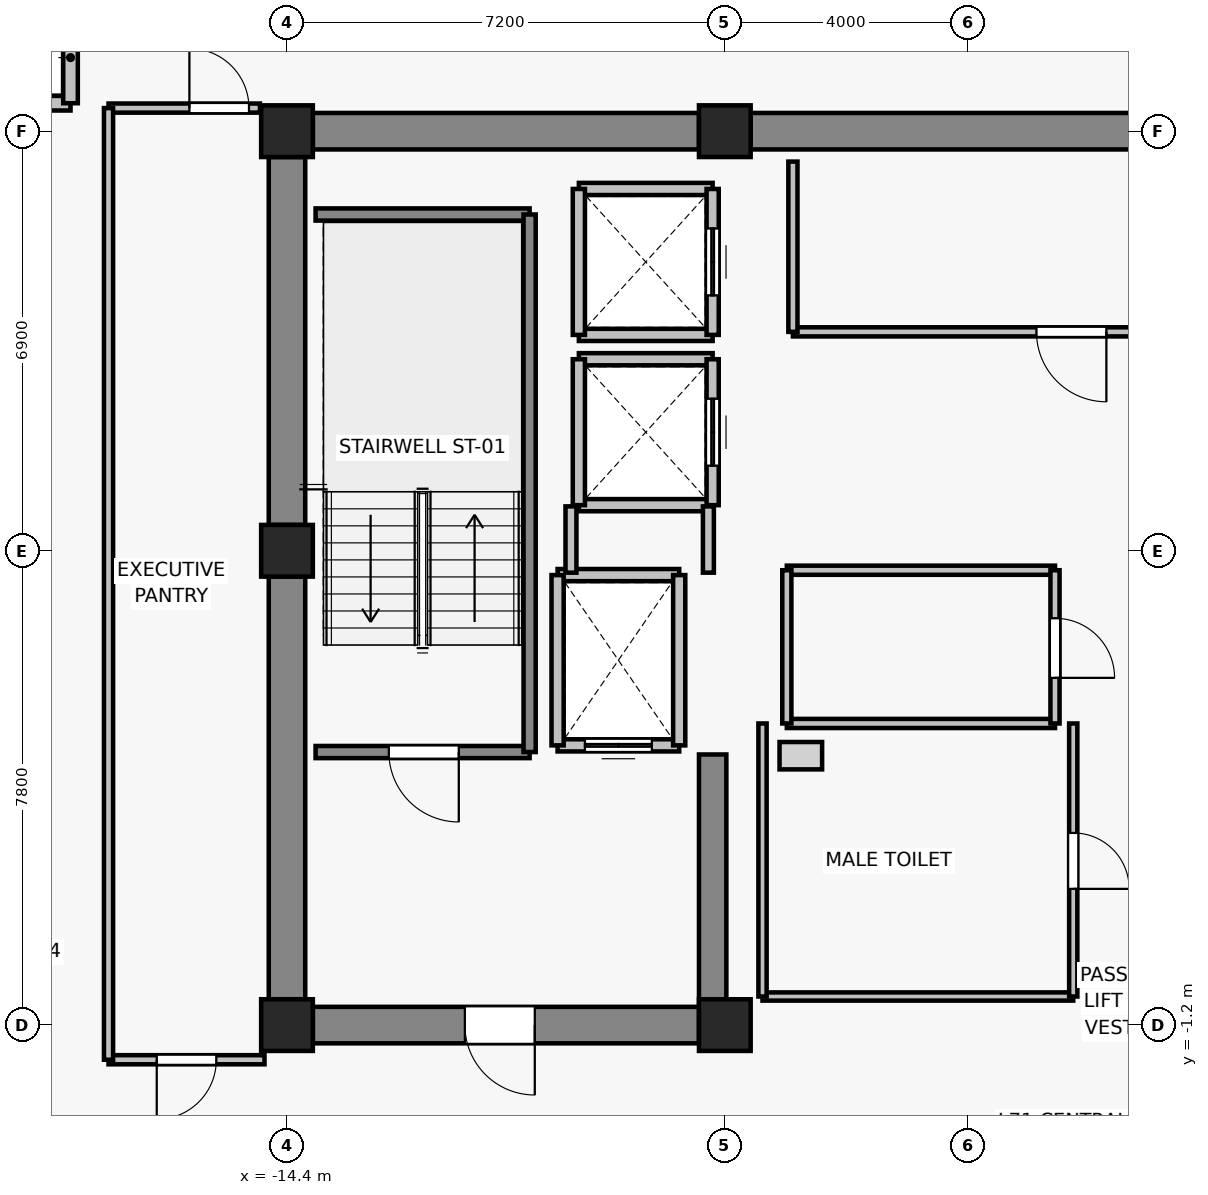
"""IFC4 building model, lengths in metres.
Left out: names, types, materials, properties, quantities, classifications, styles, units other than length and angle.
Written with IfcOpenShell. Run it as: python <this file> out.ifc"""

import sys

from ifc_helpers import new_model, si_unit, direction, frame, frame_2d, origin, origin_2d, place, context, subcontext, project, spatial, rectangle, extrude, source, transform, mapped, element, fill, save


model = new_model("IFC4")
c1 = context("Model", 3, precision=1e-05, world=origin(), true_north=direction((0.0, 1.0)))
c2 = subcontext(c1, "Body", "Model", "MODEL_VIEW")
j1 = project(units=[si_unit("LENGTHUNIT", "METRE"), si_unit("PLANEANGLEUNIT", "RADIAN")], contexts=[c1])
p1 = place(None, origin())
s1 = spatial("IfcSite", under=j1, at=p1, CompositionType="ELEMENT")
p2 = place(p1, origin())
s2 = spatial("IfcBuilding", under=s1, at=p2, CompositionType="ELEMENT")
p3 = place(p2, frame((0.0, 0.0, 251.8)))
s3 = spatial("IfcBuildingStorey", under=s2, at=p3, CompositionType="ELEMENT", Elevation=251.8)
for number, where, z_axis, x_axis in (
    (1, (-14.4, -1.2, 0.0), (0.0, 0.0, 1.0), (1.0, 0.0, 0.0)),
    (2, (-7.2, -1.2, 0.0), (0.0, 0.0, 1.0), (1.0, 0.0, 0.0)),
    (3, (-14.4, 6.6, 0.0), (0.0, 0.0, 1.0), (1.0, 0.0, 0.0)),
    (4, (-14.4, 13.5, 0.0), (0.0, 0.0, 1.0), (1.0, 0.0, 0.0)),
    (5, (-7.2, 13.5, 0.0), (0.0, 0.0, 1.0), (1.0, 0.0, 0.0)),
):
    element("IfcColumn", number, at=place(p3, frame(where, z_axis=z_axis, x_axis=x_axis)), inside=s3, PredefinedType="COLUMN", context=c2, shape_type="SweptSolid", body=[
        extrude(rectangle(XDim=0.85, YDim=0.85, at=origin_2d()), origin(), (0.0, 0.0, 1.0), 3.3),
    ])
p4 = place(p3, frame((-13.975, 13.5, 0.0), z_axis=(0.0, 0.0, 1.0), x_axis=(1.0, 0.0, 0.0)))
e6 = element("IfcWall", 6, at=p4, inside=s3, PredefinedType="SHEAR", context=c2, shape_type="SweptSolid", body=[
    extrude(rectangle(XDim=6.35, YDim=0.6, at=frame_2d((3.175, 0.0))), origin(), (0.0, 0.0, 1.0), 3.075),
])
p5 = place(p3, frame((-6.775, 13.5, 0.0), z_axis=(0.0, 0.0, 1.0), x_axis=(1.0, 0.0, 0.0)))
e7 = element("IfcWall", 7, at=p5, inside=s3, PredefinedType="SHEAR", context=c2, shape_type="SweptSolid", body=[
    extrude(rectangle(XDim=13.55, YDim=0.6, at=frame_2d((6.775, 0.0))), origin(), (0.0, 0.0, 1.0), 3.075),
])
p6 = place(p3, frame((-14.4, -0.775, 0.0), z_axis=(0.0, 0.0, 1.0), x_axis=(0.0, 1.0, 0.0)))
e8 = element("IfcWall", 8, at=p6, inside=s3, PredefinedType="SHEAR", context=c2, shape_type="SweptSolid", body=[
    extrude(rectangle(XDim=6.95, YDim=0.6, at=frame_2d((3.475, 0.0))), origin(), (0.0, 0.0, 1.0), 3.075),
])
p7 = place(p3, frame((-14.4, 7.025, 0.0), z_axis=(0.0, 0.0, 1.0), x_axis=(0.0, 1.0, 0.0)))
e9 = element("IfcWall", 9, at=p7, inside=s3, PredefinedType="SHEAR", context=c2, shape_type="SweptSolid", body=[
    extrude(rectangle(XDim=6.05, YDim=0.6, at=frame_2d((3.025, 0.0))), origin(), (0.0, 0.0, 1.0), 3.075),
])
p8 = place(p3, frame((-7.625, -1.2, 0.0), z_axis=(0.0, 0.0, 1.0), x_axis=(-1.0, 0.0, 0.0)))
e10 = element("IfcWall", 10, at=p8, inside=s3, PredefinedType="SHEAR", context=c2, shape_type="SweptSolid", body=[
    extrude(rectangle(XDim=6.35, YDim=0.6, at=frame_2d((3.175, 0.0))), origin(), (0.0, 0.0, 1.0), 3.075),
])
p9 = place(p8, frame((2.7, 0.0, 0.0)))
e11 = element("IfcOpeningElement", 11, at=p9, cuts=e10, PredefinedType="OPENING", context=c2, shape_type="SweptSolid", body=[
    extrude(rectangle(XDim=1.15, YDim=2.15, at=frame_2d((0.575, 1.075))), frame((0.0, 0.31, 0.0), z_axis=(0.0, -1.0, 0.0), x_axis=(1.0, 0.0, 0.0)), (0.0, 0.0, 1.0), 0.62),
])
p10 = place(p3, frame((-7.4, -0.9, 0.0), z_axis=(0.0, 0.0, 1.0), x_axis=(0.0, 1.0, 0.0)))
e12 = element("IfcWall", 12, at=p10, inside=s3, PredefinedType="SHEAR", context=c2, shape_type="SweptSolid", body=[
    extrude(rectangle(XDim=4.15, YDim=0.45, at=frame_2d((2.075, 0.0))), origin(), (0.0, 0.0, 1.0), 3.075),
])
for number, where, z_axis, x_axis in (
    (13, (-17.96, 13.96, 0.0), (0.0, 0.0, 1.0), (-1.0, 0.0, 0.0)),
    (14, (-17.96, 15.46, 0.0), (0.0, 0.0, 1.0), (0.0, -1.0, 0.0)),
):
    element("IfcWall", number, at=place(p3, frame(where, z_axis=z_axis, x_axis=x_axis)), inside=s3, PredefinedType="SOLIDWALL", context=c2, shape_type="SweptSolid", body=[
        extrude(rectangle(XDim=1.5, YDim=0.24, at=frame_2d((0.75, 0.0))), origin(), (0.0, 0.0, 1.0), 3.075),
    ])
p11 = place(p3, frame((-7.95, 3.4, 0.0), z_axis=(0.0, 0.0, 1.0), x_axis=(-1.0, 0.0, 0.0)))
e15 = element("IfcWall", 15, at=p11, inside=s3, PredefinedType="SOLIDWALL", context=c2, shape_type="SweptSolid", body=[
    extrude(rectangle(XDim=2.0, YDim=0.2, at=frame_2d((1.0, 0.0))), origin(), (0.0, 0.0, 1.0), 3.075),
])
p12 = place(p11, frame((0.45, 0.0, 0.0)))
e16 = element("IfcOpeningElement", 16, at=p12, cuts=e15, PredefinedType="OPENING", context=c2, shape_type="SweptSolid", body=[
    extrude(rectangle(XDim=1.1, YDim=2.2, at=frame_2d((0.55, 1.1))), frame((0.0, 0.11, 0.0), z_axis=(0.0, -1.0, 0.0), x_axis=(1.0, 0.0, 0.0)), (0.0, 0.0, 1.0), 0.22),
])
p13 = place(p3, frame((-9.95, 6.2, 0.0), z_axis=(0.0, 0.0, 1.0), x_axis=(1.0, 0.0, 0.0)))
e17 = element("IfcWall", 17, at=p13, inside=s3, PredefinedType="SOLIDWALL", context=c2, shape_type="SweptSolid", body=[
    extrude(rectangle(XDim=2.0, YDim=0.2, at=frame_2d((1.0, 0.0))), origin(), (0.0, 0.0, 1.0), 3.075),
])
for number, where, z_axis, x_axis in (
    (18, (-9.95, 3.4, 0.0), (0.0, 0.0, 1.0), (0.0, 1.0, 0.0)),
    (19, (-7.95, 6.2, 0.0), (0.0, 0.0, 1.0), (0.0, -1.0, 0.0)),
):
    element("IfcWall", number, at=place(p3, frame(where, z_axis=z_axis, x_axis=x_axis)), inside=s3, PredefinedType="SOLIDWALL", context=c2, shape_type="SweptSolid", body=[
        extrude(rectangle(XDim=2.8, YDim=0.2, at=frame_2d((1.4, 0.0))), origin(), (0.0, 0.0, 1.0), 3.075),
    ])
for number, where, z_axis, x_axis in (
    (20, (-7.4, 7.35, 0.0), (0.0, 0.0, 1.0), (-1.0, 0.0, 0.0)),
    (21, (-9.6, 9.75, 0.0), (0.0, 0.0, 1.0), (1.0, 0.0, 0.0)),
):
    element("IfcWall", number, at=place(p3, frame(where, z_axis=z_axis, x_axis=x_axis)), inside=s3, PredefinedType="SOLIDWALL", context=c2, shape_type="SweptSolid", body=[
        extrude(rectangle(XDim=2.2, YDim=0.2, at=frame_2d((1.1, 0.0))), origin(), (0.0, 0.0, 1.0), 2.615),
    ])
p14 = place(p3, frame((-9.6, 7.35, 0.0), z_axis=(0.0, 0.0, 1.0), x_axis=(0.0, 1.0, 0.0)))
e22 = element("IfcWall", 22, at=p14, inside=s3, PredefinedType="SOLIDWALL", context=c2, shape_type="SweptSolid", body=[
    extrude(rectangle(XDim=2.4, YDim=0.2, at=frame_2d((1.2, 0.0))), origin(), (0.0, 0.0, 1.0), 3.075),
])
p15 = place(p3, frame((-7.4, 9.75, 0.0), z_axis=(0.0, 0.0, 1.0), x_axis=(0.0, -1.0, 0.0)))
e23 = element("IfcWall", 23, at=p15, inside=s3, PredefinedType="SOLIDWALL", context=c2, shape_type="SweptSolid", body=[
    extrude(rectangle(XDim=2.4, YDim=0.2, at=frame_2d((1.2, 0.0))), origin(), (0.0, 0.0, 1.0), 2.615),
])
p16 = place(p15, frame((0.65, 0.0, 0.0)))
e24 = element("IfcOpeningElement", 24, at=p16, cuts=e23, PredefinedType="OPENING", context=c2, shape_type="SweptSolid", body=[
    extrude(rectangle(XDim=1.1, YDim=2.2, at=frame_2d((0.55, 1.1))), frame((0.0, 0.11, 0.0), z_axis=(0.0, -1.0, 0.0), x_axis=(1.0, 0.0, 0.0)), (0.0, 0.0, 1.0), 0.22),
])
for number, where, z_axis, x_axis in (
    (25, (-7.4, 10.15, 0.0), (0.0, 0.0, 1.0), (-1.0, 0.0, 0.0)),
    (26, (-9.6, 12.55, 0.0), (0.0, 0.0, 1.0), (1.0, 0.0, 0.0)),
):
    element("IfcWall", number, at=place(p3, frame(where, z_axis=z_axis, x_axis=x_axis)), inside=s3, PredefinedType="SOLIDWALL", context=c2, shape_type="SweptSolid", body=[
        extrude(rectangle(XDim=2.2, YDim=0.2, at=frame_2d((1.1, 0.0))), origin(), (0.0, 0.0, 1.0), 2.615),
    ])
p17 = place(p3, frame((-9.6, 10.15, 0.0), z_axis=(0.0, 0.0, 1.0), x_axis=(0.0, 1.0, 0.0)))
e27 = element("IfcWall", 27, at=p17, inside=s3, PredefinedType="SOLIDWALL", context=c2, shape_type="SweptSolid", body=[
    extrude(rectangle(XDim=2.4, YDim=0.2, at=frame_2d((1.2, 0.0))), origin(), (0.0, 0.0, 1.0), 3.075),
])
p18 = place(p3, frame((-7.4, 12.55, 0.0), z_axis=(0.0, 0.0, 1.0), x_axis=(0.0, -1.0, 0.0)))
e28 = element("IfcWall", 28, at=p18, inside=s3, PredefinedType="SOLIDWALL", context=c2, shape_type="SweptSolid", body=[
    extrude(rectangle(XDim=2.4, YDim=0.2, at=frame_2d((1.2, 0.0))), origin(), (0.0, 0.0, 1.0), 2.615),
])
p19 = place(p18, frame((0.65, 0.0, 0.0)))
e29 = element("IfcOpeningElement", 29, at=p19, cuts=e28, PredefinedType="OPENING", context=c2, shape_type="SweptSolid", body=[
    extrude(rectangle(XDim=1.1, YDim=2.2, at=frame_2d((0.55, 1.1))), frame((0.0, 0.11, 0.0), z_axis=(0.0, -1.0, 0.0), x_axis=(1.0, 0.0, 0.0)), (0.0, 0.0, 1.0), 0.22),
])
p20 = place(p3, frame((-10.41, 3.29, 0.0), z_axis=(0.0, 0.0, 1.0), x_axis=(-1.0, 0.0, 0.0)))
e30 = element("IfcWall", 30, at=p20, inside=s3, PredefinedType="SOLIDWALL", context=c2, shape_type="SweptSolid", body=[
    extrude(rectangle(XDim=3.52, YDim=0.2, at=frame_2d((1.76, 0.0))), origin(), (0.0, 0.0, 1.0), 3.075),
])
p21 = place(p20, frame((1.165, 0.0, 0.0)))
e31 = element("IfcOpeningElement", 31, at=p21, cuts=e30, PredefinedType="OPENING", context=c2, shape_type="SweptSolid", body=[
    extrude(rectangle(XDim=1.15, YDim=2.15, at=frame_2d((0.575, 1.075))), frame((0.0, 0.11, 0.0), z_axis=(0.0, -1.0, 0.0), x_axis=(1.0, 0.0, 0.0)), (0.0, 0.0, 1.0), 0.22),
])
p22 = place(p3, frame((-13.93, 12.13, 0.0), z_axis=(0.0, 0.0, 1.0), x_axis=(1.0, 0.0, 0.0)))
e32 = element("IfcWall", 32, at=p22, inside=s3, PredefinedType="SOLIDWALL", context=c2, shape_type="SweptSolid", body=[
    extrude(rectangle(XDim=3.52, YDim=0.2, at=frame_2d((1.76, 0.0))), origin(), (0.0, 0.0, 1.0), 3.075),
])
p23 = place(p3, frame((-10.41, 12.13, 0.0), z_axis=(0.0, 0.0, 1.0), x_axis=(0.0, -1.0, 0.0)))
e33 = element("IfcWall", 33, at=p23, inside=s3, PredefinedType="SOLIDWALL", context=c2, shape_type="SweptSolid", body=[
    extrude(rectangle(XDim=8.84, YDim=0.2, at=frame_2d((4.42, 0.0))), origin(), (0.0, 0.0, 1.0), 3.075),
])
p24 = place(p3, frame((-9.73, 6.24, 0.0), z_axis=(0.0, 0.0, 1.0), x_axis=(0.0, 1.0, 0.0)))
e34 = element("IfcWall", 34, at=p24, inside=s3, PredefinedType="PARTITIONING", context=c2, shape_type="SweptSolid", body=[
    extrude(rectangle(XDim=1.09, YDim=0.18, at=frame_2d((0.545, 0.0))), origin(), (0.0, 0.0, 1.0), 3.075),
])
p25 = place(p3, frame((-7.47, 7.33, 0.0), z_axis=(0.0, 0.0, 1.0), x_axis=(0.0, -1.0, 0.0)))
e35 = element("IfcWall", 35, at=p25, inside=s3, PredefinedType="PARTITIONING", context=c2, shape_type="SweptSolid", body=[
    extrude(rectangle(XDim=1.09, YDim=0.18, at=frame_2d((0.545, 0.0))), origin(), (0.0, 0.0, 1.0), 2.615),
])
p26 = place(p3, frame((6.08, 10.2, 0.0), z_axis=(0.0, 0.0, 1.0), x_axis=(-1.0, 0.0, 0.0)))
e36 = element("IfcWall", 36, at=p26, inside=s3, PredefinedType="PARTITIONING", context=c2, shape_type="SweptSolid", body=[
    extrude(rectangle(XDim=12.16, YDim=0.15, at=frame_2d((6.08, 0.0))), origin(), (0.0, 0.0, 1.0), 3.075),
])
p27 = place(p26, frame((7.005, 0.0, 0.0)))
e37 = element("IfcOpeningElement", 37, at=p27, cuts=e36, PredefinedType="OPENING", context=c2, shape_type="SweptSolid", body=[
    extrude(rectangle(XDim=1.15, YDim=2.15, at=frame_2d((0.575, 1.075))), frame((0.0, 0.085, 0.0), z_axis=(0.0, -1.0, 0.0), x_axis=(1.0, 0.0, 0.0)), (0.0, 0.0, 1.0), 0.17),
])
p28 = place(p3, frame((-6.08, 10.2, 0.0), z_axis=(0.0, 0.0, 1.0), x_axis=(0.0, 1.0, 0.0)))
e38 = element("IfcWall", 38, at=p28, inside=s3, PredefinedType="PARTITIONING", context=c2, shape_type="SweptSolid", body=[
    extrude(rectangle(XDim=2.8, YDim=0.15, at=frame_2d((1.4, 0.0))), origin(), (0.0, 0.0, 1.0), 3.075),
])
for number, where, z_axis, x_axis in (
    (39, (-1.77, 3.76, 0.0), (0.0, 0.0, 1.0), (-1.0, 0.0, 0.0)),
    (40, (-6.18, 6.28, 0.0), (0.0, 0.0, 1.0), (1.0, 0.0, 0.0)),
):
    element("IfcWall", number, at=place(p3, frame(where, z_axis=z_axis, x_axis=x_axis)), inside=s3, PredefinedType="PARTITIONING", context=c2, shape_type="SweptSolid", body=[
        extrude(rectangle(XDim=4.41, YDim=0.15, at=frame_2d((2.205, 0.0))), origin(), (0.0, 0.0, 1.0), 3.075),
    ])
p29 = place(p3, frame((-6.18, 3.76, 0.0), z_axis=(0.0, 0.0, 1.0), x_axis=(0.0, 1.0, 0.0)))
e41 = element("IfcWall", 41, at=p29, inside=s3, PredefinedType="PARTITIONING", context=c2, shape_type="SweptSolid", body=[
    extrude(rectangle(XDim=2.52, YDim=0.15, at=frame_2d((1.26, 0.0))), origin(), (0.0, 0.0, 1.0), 3.075),
])
p30 = place(p3, frame((-1.77, 6.28, 0.0), z_axis=(0.0, 0.0, 1.0), x_axis=(0.0, -1.0, 0.0)))
e42 = element("IfcWall", 42, at=p30, inside=s3, PredefinedType="PARTITIONING", context=c2, shape_type="SweptSolid", body=[
    extrude(rectangle(XDim=2.52, YDim=0.15, at=frame_2d((1.26, 0.0))), origin(), (0.0, 0.0, 1.0), 3.075),
])
p31 = place(p30, frame((0.79, 0.0, 0.0)))
e43 = element("IfcOpeningElement", 43, at=p31, cuts=e42, PredefinedType="OPENING", context=c2, shape_type="SweptSolid", body=[
    extrude(rectangle(XDim=0.98, YDim=2.15, at=frame_2d((0.49, 1.075))), frame((0.0, 0.085, 0.0), z_axis=(0.0, -1.0, 0.0), x_axis=(1.0, 0.0, 0.0)), (0.0, 0.0, 1.0), 0.17),
])
p32 = place(p3, frame((-1.47, -0.73, 0.0), z_axis=(0.0, 0.0, 1.0), x_axis=(-1.0, 0.0, 0.0)))
e44 = element("IfcWall", 44, at=p32, inside=s3, PredefinedType="PARTITIONING", context=c2, shape_type="SweptSolid", body=[
    extrude(rectangle(XDim=5.11, YDim=0.135, at=frame_2d((2.555, 0.0))), origin(), (0.0, 0.0, 1.0), 3.075),
])
p33 = place(p3, frame((-6.58, -0.73, 0.0), z_axis=(0.0, 0.0, 1.0), x_axis=(0.0, 1.0, 0.0)))
e45 = element("IfcWall", 45, at=p33, inside=s3, PredefinedType="PARTITIONING", context=c2, shape_type="SweptSolid", body=[
    extrude(rectangle(XDim=4.49, YDim=0.135, at=frame_2d((2.245, 0.0))), origin(), (0.0, 0.0, 1.0), 3.075),
])
p34 = place(p3, frame((-1.47, 3.76, 0.0), z_axis=(0.0, 0.0, 1.0), x_axis=(0.0, -1.0, 0.0)))
e46 = element("IfcWall", 46, at=p34, inside=s3, PredefinedType="PARTITIONING", context=c2, shape_type="SweptSolid", body=[
    extrude(rectangle(XDim=4.49, YDim=0.135, at=frame_2d((2.245, 0.0))), origin(), (0.0, 0.0, 1.0), 3.075),
])
p35 = place(p34, frame((1.8, 0.0, 0.0)))
e47 = element("IfcOpeningElement", 47, at=p35, cuts=e46, PredefinedType="OPENING", context=c2, shape_type="SweptSolid", body=[
    extrude(rectangle(XDim=0.92, YDim=2.1, at=frame_2d((0.46, 1.05))), frame((0.0, 0.077, 0.0), z_axis=(0.0, -1.0, 0.0), x_axis=(1.0, 0.0, 0.0)), (0.0, 0.0, 1.0), 0.155),
])
p36 = place(p3, frame((-14.77, -1.77, 0.0), z_axis=(0.0, 0.0, 1.0), x_axis=(-1.0, 0.0, 0.0)))
e48 = element("IfcWall", 48, at=p36, inside=s3, PredefinedType="PARTITIONING", context=c2, shape_type="SweptSolid", body=[
    extrude(rectangle(XDim=2.565, YDim=0.15, at=frame_2d((1.282, 0.0))), origin(), (0.0, 0.0, 1.0), 3.075),
])
p37 = place(p36, frame((0.792, 0.0, 0.0)))
e49 = element("IfcOpeningElement", 49, at=p37, cuts=e48, PredefinedType="OPENING", context=c2, shape_type="SweptSolid", body=[
    extrude(rectangle(XDim=0.98, YDim=2.15, at=frame_2d((0.49, 1.075))), frame((0.0, 0.085, 0.0), z_axis=(0.0, -1.0, 0.0), x_axis=(1.0, 0.0, 0.0)), (0.0, 0.0, 1.0), 0.17),
])
p38 = place(p3, frame((-17.335, 13.88, 0.0), z_axis=(0.0, 0.0, 1.0), x_axis=(1.0, 0.0, 0.0)))
e50 = element("IfcWall", 50, at=p38, inside=s3, PredefinedType="PARTITIONING", context=c2, shape_type="SweptSolid", body=[
    extrude(rectangle(XDim=2.49, YDim=0.15, at=frame_2d((1.245, 0.0))), origin(), (0.0, 0.0, 1.0), 3.075),
])
p39 = place(p38, frame((1.33, 0.0, 0.0)))
e51 = element("IfcOpeningElement", 51, at=p39, cuts=e50, PredefinedType="OPENING", context=c2, shape_type="SweptSolid", body=[
    extrude(rectangle(XDim=0.98, YDim=2.15, at=frame_2d((0.49, 1.075))), frame((0.0, 0.085, 0.0), z_axis=(0.0, -1.0, 0.0), x_axis=(1.0, 0.0, 0.0)), (0.0, 0.0, 1.0), 0.17),
])
p40 = place(p3, frame((-17.335, -1.77, 0.0), z_axis=(0.0, 0.0, 1.0), x_axis=(0.0, 1.0, 0.0)))
e52 = element("IfcWall", 52, at=p40, inside=s3, PredefinedType="PARTITIONING", context=c2, shape_type="SweptSolid", body=[
    extrude(rectangle(XDim=15.65, YDim=0.15, at=frame_2d((7.825, 0.0))), origin(), (0.0, 0.0, 1.0), 2.615),
])
m1 = source(origin(), c2, "Body", "SweptSolid", [
    extrude(rectangle(XDim=1.1, YDim=2.2, at=frame_2d((0.55, 1.1))), frame((0.0, 0.025, 0.0), z_axis=(0.0, -1.0, 0.0), x_axis=(1.0, 0.0, 0.0)), (0.0, 0.0, 1.0), 0.05),
])
p41 = place(p12, origin())
e53 = element("IfcDoor", 53, at=p41, inside=s3, OperationType="DOUBLE_DOOR_SLIDING", PredefinedType="DOOR", context=c2, shape_type="MappedRepresentation", body=[
    mapped(m1, transform((0.0, 0.0, 0.0), x_axis=(1.0, 0.0, 0.0), y_axis=(0.0, 1.0, 0.0), z_axis=(0.0, 0.0, 1.0), scale=1.0)),
])
fill(e16, e53)
p42 = place(p16, origin())
e54 = element("IfcDoor", 54, at=p42, inside=s3, OperationType="DOUBLE_DOOR_SLIDING", PredefinedType="DOOR", context=c2, shape_type="MappedRepresentation", body=[
    mapped(m1, transform((0.0, 0.0, 0.0), x_axis=(1.0, 0.0, 0.0), y_axis=(0.0, 1.0, 0.0), z_axis=(0.0, 0.0, 1.0), scale=1.0)),
])
fill(e24, e54)
p43 = place(p19, origin())
e55 = element("IfcDoor", 55, at=p43, inside=s3, OperationType="DOUBLE_DOOR_SLIDING", PredefinedType="DOOR", context=c2, shape_type="MappedRepresentation", body=[
    mapped(m1, transform((0.0, 0.0, 0.0), x_axis=(1.0, 0.0, 0.0), y_axis=(0.0, 1.0, 0.0), z_axis=(0.0, 0.0, 1.0), scale=1.0)),
])
fill(e29, e55)
m2 = source(origin(), c2, "Body", "SweptSolid", [
    extrude(rectangle(XDim=1.15, YDim=2.15, at=frame_2d((0.575, 1.075))), frame((0.0, 0.025, 0.0), z_axis=(0.0, -1.0, 0.0), x_axis=(1.0, 0.0, 0.0)), (0.0, 0.0, 1.0), 0.05),
])
p44 = place(p21, origin())
e56 = element("IfcDoor", 56, at=p44, inside=s3, OperationType="SINGLE_SWING_LEFT", PredefinedType="DOOR", context=c2, shape_type="MappedRepresentation", body=[
    mapped(m2, transform((0.0, 0.0, 0.0), x_axis=(1.0, 0.0, 0.0), y_axis=(0.0, 1.0, 0.0), z_axis=(0.0, 0.0, 1.0), scale=1.0)),
])
fill(e31, e56)
p45 = place(p9, origin())
e57 = element("IfcDoor", 57, at=p45, inside=s3, OperationType="SINGLE_SWING_LEFT", PredefinedType="DOOR", context=c2, shape_type="MappedRepresentation", body=[
    mapped(m2, transform((0.0, 0.0, 0.0), x_axis=(1.0, 0.0, 0.0), y_axis=(0.0, 1.0, 0.0), z_axis=(0.0, 0.0, 1.0), scale=1.0)),
])
fill(e11, e57)
p46 = place(p27, origin())
e58 = element("IfcDoor", 58, at=p46, inside=s3, OperationType="SINGLE_SWING_LEFT", PredefinedType="DOOR", context=c2, shape_type="MappedRepresentation", body=[
    mapped(m2, transform((0.0, 0.0, 0.0), x_axis=(1.0, 0.0, 0.0), y_axis=(0.0, 1.0, 0.0), z_axis=(0.0, 0.0, 1.0), scale=1.0)),
])
fill(e37, e58)
m3 = source(origin(), c2, "Body", "SweptSolid", [
    extrude(rectangle(XDim=0.98, YDim=2.15, at=frame_2d((0.49, 1.075))), frame((0.0, 0.025, 0.0), z_axis=(0.0, -1.0, 0.0), x_axis=(1.0, 0.0, 0.0)), (0.0, 0.0, 1.0), 0.05),
])
p47 = place(p31, origin())
e59 = element("IfcDoor", 59, at=p47, inside=s3, OperationType="SINGLE_SWING_RIGHT", PredefinedType="DOOR", context=c2, shape_type="MappedRepresentation", body=[
    mapped(m3, transform((0.0, 0.0, 0.0), x_axis=(1.0, 0.0, 0.0), y_axis=(0.0, 1.0, 0.0), z_axis=(0.0, 0.0, 1.0), scale=1.0)),
])
fill(e43, e59)
m4 = source(origin(), c2, "Body", "SweptSolid", [
    extrude(rectangle(XDim=0.92, YDim=2.1, at=frame_2d((0.46, 1.05))), frame((0.0, 0.025, 0.0), z_axis=(0.0, -1.0, 0.0), x_axis=(1.0, 0.0, 0.0)), (0.0, 0.0, 1.0), 0.05),
])
p48 = place(p35, origin())
e60 = element("IfcDoor", 60, at=p48, inside=s3, OperationType="SINGLE_SWING_RIGHT", PredefinedType="DOOR", context=c2, shape_type="MappedRepresentation", body=[
    mapped(m4, transform((0.0, 0.0, 0.0), x_axis=(1.0, 0.0, 0.0), y_axis=(0.0, 1.0, 0.0), z_axis=(0.0, 0.0, 1.0), scale=1.0)),
])
fill(e47, e60)
p49 = place(p37, origin())
e61 = element("IfcDoor", 61, at=p49, inside=s3, OperationType="SINGLE_SWING_RIGHT", PredefinedType="DOOR", context=c2, shape_type="MappedRepresentation", body=[
    mapped(m3, transform((0.0, 0.0, 0.0), x_axis=(1.0, 0.0, 0.0), y_axis=(0.0, 1.0, 0.0), z_axis=(0.0, 0.0, 1.0), scale=1.0)),
])
fill(e49, e61)
p50 = place(p39, origin())
e62 = element("IfcDoor", 62, at=p50, inside=s3, OperationType="SINGLE_SWING_LEFT", PredefinedType="DOOR", context=c2, shape_type="MappedRepresentation", body=[
    mapped(m3, transform((0.0, 0.0, 0.0), x_axis=(1.0, 0.0, 0.0), y_axis=(0.0, 1.0, 0.0), z_axis=(0.0, 0.0, 1.0), scale=1.0)),
])
fill(e51, e62)
save(model, sys.argv[1])
